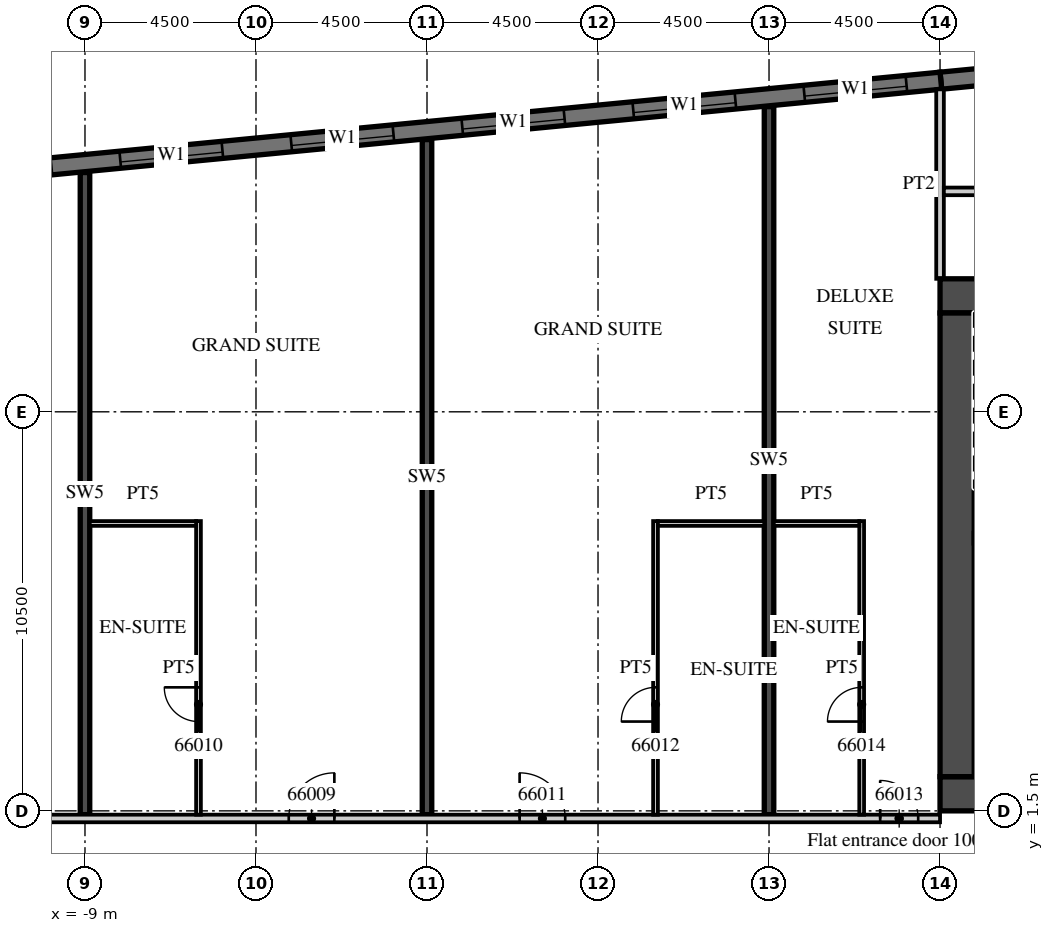
"""IFC4 building model, lengths in metres.
Left out: names, types, materials, properties, quantities, classifications, styles, units other than length and angle.
Written with IfcOpenShell. Run it as: python <this file> out.ifc"""

import sys

from ifc_helpers import new_model, si_unit, direction, frame, frame_2d, origin, place, context, subcontext, project, spatial, rectangle, extrude, element, fill, save


model = new_model("IFC4")
c1 = context("Model", 3, precision=1e-05, world=origin(), true_north=direction((0.0, 1.0)))
c2 = subcontext(c1, "Body", "Model", "MODEL_VIEW")
j1 = project(units=[si_unit("LENGTHUNIT", "METRE"), si_unit("PLANEANGLEUNIT", "RADIAN")], contexts=[c1])
p1 = place(None, origin())
s1 = spatial("IfcSite", under=j1, at=p1, CompositionType="ELEMENT")
p2 = place(p1, origin())
s2 = spatial("IfcBuilding", under=s1, at=p2, CompositionType="ELEMENT")
p3 = place(p2, frame((0.0, 0.0, 268.5)))
s3 = spatial("IfcBuildingStorey", under=s2, at=p3, CompositionType="ELEMENT", Elevation=268.5)
p4 = place(p3, frame((-9.0, 1.4, 0.0), z_axis=(0.0, 0.0, 1.0), x_axis=(0.0, 1.0, 0.0)))
e1 = element("IfcWall", 1, at=p4, inside=s3, PredefinedType="SHEAR", context=c2, shape_type="SweptSolid", body=[
    extrude(rectangle(XDim=16.896, YDim=0.25, at=frame_2d((8.448, 0.0))), origin(), (0.0, 0.0, 1.0), 3.3),
])
p5 = place(p3, frame((0.0, 1.4, 0.0), z_axis=(0.0, 0.0, 1.0), x_axis=(0.0, 1.0, 0.0)))
e2 = element("IfcWall", 2, at=p5, inside=s3, PredefinedType="SHEAR", context=c2, shape_type="SweptSolid", body=[
    extrude(rectangle(XDim=17.763, YDim=0.25, at=frame_2d((8.881, 0.0))), origin(), (0.0, 0.0, 1.0), 3.3),
])
p6 = place(p3, frame((9.0, 1.4, 0.0), z_axis=(0.0, 0.0, 1.0), x_axis=(0.0, 1.0, 0.0)))
e3 = element("IfcWall", 3, at=p6, inside=s3, PredefinedType="SHEAR", context=c2, shape_type="SweptSolid", body=[
    extrude(rectangle(XDim=18.629, YDim=0.25, at=frame_2d((9.315, 0.0))), origin(), (0.0, 0.0, 1.0), 3.3),
])
p7 = place(p3, frame((30.946, 22.391, 0.0), z_axis=(0.0, 0.0, 1.0), x_axis=(-0.995396397117, -0.095843688398, 0.0)))
e4 = element("IfcWall", 4, at=p7, inside=s3, PredefinedType="SOLIDWALL", context=c2, shape_type="SweptSolid", body=[
    extrude(rectangle(XDim=17.505, YDim=0.45, at=frame_2d((8.752, 0.0))), origin(), (0.0, 0.0, 1.0), 3.02),
])
p8 = place(p3, frame((13.521, 20.713, 0.0), z_axis=(0.0, 0.0, 1.0), x_axis=(-0.995396277313, -0.095844932638, 0.0)))
e5 = element("IfcWall", 5, at=p8, inside=s3, PredefinedType="SOLIDWALL", context=c2, shape_type="SweptSolid", body=[
    extrude(rectangle(XDim=51.495, YDim=0.45, at=frame_2d((25.748, 0.0))), origin(), (0.0, 0.0, 1.0), 3.02),
])
p9 = place(p8, frame((0.91, 0.0, 0.45)))
e6 = element("IfcOpeningElement", 6, at=p9, cuts=e5, PredefinedType="OPENING", context=c2, shape_type="SweptSolid", body=[
    extrude(rectangle(XDim=2.7, YDim=2.25, at=frame_2d((1.35, 1.125))), frame((0.0, 0.235, 0.0), z_axis=(0.0, -1.0, 0.0), x_axis=(1.0, 0.0, 0.0)), (0.0, 0.0, 1.0), 0.47),
])
p10 = place(p8, frame((5.431, 0.0, 0.45)))
e7 = element("IfcOpeningElement", 7, at=p10, cuts=e5, PredefinedType="OPENING", context=c2, shape_type="SweptSolid", body=[
    extrude(rectangle(XDim=2.7, YDim=2.25, at=frame_2d((1.35, 1.125))), frame((0.0, 0.235, 0.0), z_axis=(0.0, -1.0, 0.0), x_axis=(1.0, 0.0, 0.0)), (0.0, 0.0, 1.0), 0.47),
])
p11 = place(p8, frame((9.952, 0.0, 0.45)))
e8 = element("IfcOpeningElement", 8, at=p11, cuts=e5, PredefinedType="OPENING", context=c2, shape_type="SweptSolid", body=[
    extrude(rectangle(XDim=2.7, YDim=2.25, at=frame_2d((1.35, 1.125))), frame((0.0, 0.235, 0.0), z_axis=(0.0, -1.0, 0.0), x_axis=(1.0, 0.0, 0.0)), (0.0, 0.0, 1.0), 0.47),
])
p12 = place(p8, frame((14.473, 0.0, 0.45)))
e9 = element("IfcOpeningElement", 9, at=p12, cuts=e5, PredefinedType="OPENING", context=c2, shape_type="SweptSolid", body=[
    extrude(rectangle(XDim=2.7, YDim=2.25, at=frame_2d((1.35, 1.125))), frame((0.0, 0.235, 0.0), z_axis=(0.0, -1.0, 0.0), x_axis=(1.0, 0.0, 0.0)), (0.0, 0.0, 1.0), 0.47),
])
p13 = place(p8, frame((18.994, 0.0, 0.45)))
e10 = element("IfcOpeningElement", 10, at=p13, cuts=e5, PredefinedType="OPENING", context=c2, shape_type="SweptSolid", body=[
    extrude(rectangle(XDim=2.7, YDim=2.25, at=frame_2d((1.35, 1.125))), frame((0.0, 0.235, 0.0), z_axis=(0.0, -1.0, 0.0), x_axis=(1.0, 0.0, 0.0)), (0.0, 0.0, 1.0), 0.47),
])
p14 = place(p8, frame((23.514, 0.0, 0.45)))
e11 = element("IfcOpeningElement", 11, at=p14, cuts=e5, PredefinedType="OPENING", context=c2, shape_type="SweptSolid", body=[
    extrude(rectangle(XDim=2.7, YDim=2.25, at=frame_2d((1.35, 1.125))), frame((0.0, 0.235, 0.0), z_axis=(0.0, -1.0, 0.0), x_axis=(1.0, 0.0, 0.0)), (0.0, 0.0, 1.0), 0.47),
])
p15 = place(p8, frame((28.035, 0.0, 0.45)))
e12 = element("IfcOpeningElement", 12, at=p15, cuts=e5, PredefinedType="OPENING", context=c2, shape_type="SweptSolid", body=[
    extrude(rectangle(XDim=2.7, YDim=2.25, at=frame_2d((1.35, 1.125))), frame((0.0, 0.235, 0.0), z_axis=(0.0, -1.0, 0.0), x_axis=(1.0, 0.0, 0.0)), (0.0, 0.0, 1.0), 0.47),
])
p16 = place(p8, frame((32.556, 0.0, 0.45)))
e13 = element("IfcOpeningElement", 13, at=p16, cuts=e5, PredefinedType="OPENING", context=c2, shape_type="SweptSolid", body=[
    extrude(rectangle(XDim=2.7, YDim=2.25, at=frame_2d((1.35, 1.125))), frame((0.0, 0.235, 0.0), z_axis=(0.0, -1.0, 0.0), x_axis=(1.0, 0.0, 0.0)), (0.0, 0.0, 1.0), 0.47),
])
p17 = place(p8, frame((37.077, 0.0, 0.45)))
e14 = element("IfcOpeningElement", 14, at=p17, cuts=e5, PredefinedType="OPENING", context=c2, shape_type="SweptSolid", body=[
    extrude(rectangle(XDim=2.7, YDim=2.25, at=frame_2d((1.35, 1.125))), frame((0.0, 0.235, 0.0), z_axis=(0.0, -1.0, 0.0), x_axis=(1.0, 0.0, 0.0)), (0.0, 0.0, 1.0), 0.47),
])
p18 = place(p8, frame((41.598, 0.0, 0.45)))
e15 = element("IfcOpeningElement", 15, at=p18, cuts=e5, PredefinedType="OPENING", context=c2, shape_type="SweptSolid", body=[
    extrude(rectangle(XDim=2.7, YDim=2.25, at=frame_2d((1.35, 1.125))), frame((0.0, 0.235, 0.0), z_axis=(0.0, -1.0, 0.0), x_axis=(1.0, 0.0, 0.0)), (0.0, 0.0, 1.0), 0.47),
])
p19 = place(p8, frame((46.118, 0.0, 0.45)))
e16 = element("IfcOpeningElement", 16, at=p19, cuts=e5, PredefinedType="OPENING", context=c2, shape_type="SweptSolid", body=[
    extrude(rectangle(XDim=2.7, YDim=2.25, at=frame_2d((1.35, 1.125))), frame((0.0, 0.235, 0.0), z_axis=(0.0, -1.0, 0.0), x_axis=(1.0, 0.0, 0.0)), (0.0, 0.0, 1.0), 0.47),
])
p20 = place(p3, frame((13.5, 15.5, 0.0), z_axis=(0.0, 0.0, 1.0), x_axis=(0.0, 1.0, 0.0)))
e17 = element("IfcWall", 17, at=p20, inside=s3, PredefinedType="PARTITIONING", context=c2, shape_type="SweptSolid", body=[
    extrude(rectangle(XDim=4.985, YDim=0.2, at=frame_2d((2.493, 0.0))), origin(), (0.0, 0.0, 1.0), 3.02),
])
p21 = place(p3, frame((-39.909, 1.3, 0.0), z_axis=(0.0, 0.0, 1.0), x_axis=(1.0, 0.0, 0.0)))
e18 = element("IfcWall", 18, at=p21, inside=s3, PredefinedType="PARTITIONING", context=c2, shape_type="SweptSolid", body=[
    extrude(rectangle(XDim=53.409, YDim=0.2, at=frame_2d((26.705, 0.0))), origin(), (0.0, 0.0, 1.0), 3.02),
])
p22 = place(p21, frame((0.15, 0.0, 0.0)))
e19 = element("IfcOpeningElement", 19, at=p22, cuts=e18, PredefinedType="OPENING", context=c2, shape_type="SweptSolid", body=[
    extrude(rectangle(XDim=0.9, YDim=2.1, at=frame_2d((0.45, 1.05))), frame((0.0, 0.11, 0.0), z_axis=(0.0, -1.0, 0.0), x_axis=(1.0, 0.0, 0.0)), (0.0, 0.0, 1.0), 0.22),
])
p23 = place(p21, frame((9.271, 0.0, 0.0)))
e20 = element("IfcOpeningElement", 20, at=p23, cuts=e18, PredefinedType="OPENING", context=c2, shape_type="SweptSolid", body=[
    extrude(rectangle(XDim=1.2, YDim=2.1, at=frame_2d((0.6, 1.05))), frame((0.0, 0.11, 0.0), z_axis=(0.0, -1.0, 0.0), x_axis=(1.0, 0.0, 0.0)), (0.0, 0.0, 1.0), 0.22),
])
p24 = place(p21, frame((18.271, 0.0, 0.0)))
e21 = element("IfcOpeningElement", 21, at=p24, cuts=e18, PredefinedType="OPENING", context=c2, shape_type="SweptSolid", body=[
    extrude(rectangle(XDim=1.2, YDim=2.1, at=frame_2d((0.6, 1.05))), frame((0.0, 0.11, 0.0), z_axis=(0.0, -1.0, 0.0), x_axis=(1.0, 0.0, 0.0)), (0.0, 0.0, 1.0), 0.22),
])
p25 = place(p21, frame((27.271, 0.0, 0.0)))
e22 = element("IfcOpeningElement", 22, at=p25, cuts=e18, PredefinedType="OPENING", context=c2, shape_type="SweptSolid", body=[
    extrude(rectangle(XDim=1.2, YDim=2.1, at=frame_2d((0.6, 1.05))), frame((0.0, 0.11, 0.0), z_axis=(0.0, -1.0, 0.0), x_axis=(1.0, 0.0, 0.0)), (0.0, 0.0, 1.0), 0.22),
])
p26 = place(p21, frame((36.271, 0.0, 0.0)))
e23 = element("IfcOpeningElement", 23, at=p26, cuts=e18, PredefinedType="OPENING", context=c2, shape_type="SweptSolid", body=[
    extrude(rectangle(XDim=1.2, YDim=2.1, at=frame_2d((0.6, 1.05))), frame((0.0, 0.11, 0.0), z_axis=(0.0, -1.0, 0.0), x_axis=(1.0, 0.0, 0.0)), (0.0, 0.0, 1.0), 0.22),
])
p27 = place(p21, frame((42.346, 0.0, 0.0)))
e24 = element("IfcOpeningElement", 24, at=p27, cuts=e18, PredefinedType="OPENING", context=c2, shape_type="SweptSolid", body=[
    extrude(rectangle(XDim=1.2, YDim=2.1, at=frame_2d((0.6, 1.05))), frame((0.0, 0.11, 0.0), z_axis=(0.0, -1.0, 0.0), x_axis=(1.0, 0.0, 0.0)), (0.0, 0.0, 1.0), 0.22),
])
p28 = place(p21, frame((51.834, 0.0, 0.0)))
e25 = element("IfcOpeningElement", 25, at=p28, cuts=e18, PredefinedType="OPENING", context=c2, shape_type="SweptSolid", body=[
    extrude(rectangle(XDim=1.0, YDim=2.1, at=frame_2d((0.5, 1.05))), frame((0.0, 0.11, 0.0), z_axis=(0.0, -1.0, 0.0), x_axis=(1.0, 0.0, 0.0)), (0.0, 0.0, 1.0), 0.22),
])
p29 = place(p3, frame((-6.013, 1.4, 0.0), z_axis=(0.0, 0.0, 1.0), x_axis=(0.0, 1.0, 0.0)))
e26 = element("IfcWall", 26, at=p29, inside=s3, PredefinedType="PARTITIONING", context=c2, shape_type="SweptSolid", body=[
    extrude(rectangle(XDim=7.725, YDim=0.125, at=frame_2d((3.863, 0.0))), origin(), (0.0, 0.0, 1.0), 3.02),
])
p30 = place(p29, frame((2.45, 0.0, 0.0)))
e27 = element("IfcOpeningElement", 27, at=p30, cuts=e26, PredefinedType="OPENING", context=c2, shape_type="SweptSolid", body=[
    extrude(rectangle(XDim=0.9, YDim=2.1, at=frame_2d((0.45, 1.05))), frame((0.0, 0.073, 0.0), z_axis=(0.0, -1.0, 0.0), x_axis=(1.0, 0.0, 0.0)), (0.0, 0.0, 1.0), 0.145),
])
p31 = place(p3, frame((-8.875, 9.062, 0.0), z_axis=(0.0, 0.0, 1.0), x_axis=(1.0, 0.0, 0.0)))
e28 = element("IfcWall", 28, at=p31, inside=s3, PredefinedType="PARTITIONING", context=c2, shape_type="SweptSolid", body=[
    extrude(rectangle(XDim=2.8, YDim=0.125, at=frame_2d((1.4, 0.0))), origin(), (0.0, 0.0, 1.0), 3.02),
])
p32 = place(p3, frame((6.013, 1.4, 0.0), z_axis=(0.0, 0.0, 1.0), x_axis=(0.0, 1.0, 0.0)))
e29 = element("IfcWall", 29, at=p32, inside=s3, PredefinedType="PARTITIONING", context=c2, shape_type="SweptSolid", body=[
    extrude(rectangle(XDim=7.725, YDim=0.125, at=frame_2d((3.863, 0.0))), origin(), (0.0, 0.0, 1.0), 3.02),
])
p33 = place(p32, frame((2.45, 0.0, 0.0)))
e30 = element("IfcOpeningElement", 30, at=p33, cuts=e29, PredefinedType="OPENING", context=c2, shape_type="SweptSolid", body=[
    extrude(rectangle(XDim=0.9, YDim=2.1, at=frame_2d((0.45, 1.05))), frame((0.0, 0.073, 0.0), z_axis=(0.0, -1.0, 0.0), x_axis=(1.0, 0.0, 0.0)), (0.0, 0.0, 1.0), 0.145),
])
p34 = place(p3, frame((6.075, 9.062, 0.0), z_axis=(0.0, 0.0, 1.0), x_axis=(1.0, 0.0, 0.0)))
e31 = element("IfcWall", 31, at=p34, inside=s3, PredefinedType="PARTITIONING", context=c2, shape_type="SweptSolid", body=[
    extrude(rectangle(XDim=2.8, YDim=0.125, at=frame_2d((1.4, 0.0))), origin(), (0.0, 0.0, 1.0), 3.02),
])
p35 = place(p3, frame((11.438, 1.4, 0.0), z_axis=(0.0, 0.0, 1.0), x_axis=(0.0, 1.0, 0.0)))
e32 = element("IfcWall", 32, at=p35, inside=s3, PredefinedType="PARTITIONING", context=c2, shape_type="SweptSolid", body=[
    extrude(rectangle(XDim=7.725, YDim=0.125, at=frame_2d((3.863, 0.0))), origin(), (0.0, 0.0, 1.0), 3.02),
])
p36 = place(p35, frame((2.45, 0.0, 0.0)))
e33 = element("IfcOpeningElement", 33, at=p36, cuts=e32, PredefinedType="OPENING", context=c2, shape_type="SweptSolid", body=[
    extrude(rectangle(XDim=0.9, YDim=2.1, at=frame_2d((0.45, 1.05))), frame((0.0, 0.073, 0.0), z_axis=(0.0, -1.0, 0.0), x_axis=(1.0, 0.0, 0.0)), (0.0, 0.0, 1.0), 0.145),
])
p37 = place(p3, frame((9.125, 9.062, 0.0), z_axis=(0.0, 0.0, 1.0), x_axis=(1.0, 0.0, 0.0)))
e34 = element("IfcWall", 34, at=p37, inside=s3, PredefinedType="PARTITIONING", context=c2, shape_type="SweptSolid", body=[
    extrude(rectangle(XDim=2.25, YDim=0.125, at=frame_2d((1.125, 0.0))), origin(), (0.0, 0.0, 1.0), 3.02),
])
p38 = place(p3, frame((13.5, 1.95, 0.0), z_axis=(0.0, 0.0, 1.0), x_axis=(1.0, 0.0, 0.0)))
e35 = element("IfcWall", 35, at=p38, inside=s3, PredefinedType="SHEAR", context=c2, shape_type="SweptSolid", body=[
    extrude(rectangle(XDim=18.0, YDim=0.9, at=frame_2d((9.0, 0.0))), origin(), (0.0, 0.0, 1.0), 3.02),
])
p39 = place(p38, frame((1.475, 0.0, 0.0)))
e36 = element("IfcOpeningElement", 36, at=p39, cuts=e35, PredefinedType="OPENING", context=c2, shape_type="SweptSolid", body=[
    extrude(rectangle(XDim=1.8, YDim=2.1, at=frame_2d((0.9, 1.05))), frame((0.0, 0.46, 0.0), z_axis=(0.0, -1.0, 0.0), x_axis=(1.0, 0.0, 0.0)), (0.0, 0.0, 1.0), 0.92),
])
p40 = place(p3, frame((13.5, 15.05, 0.0), z_axis=(0.0, 0.0, 1.0), x_axis=(1.0, 0.0, 0.0)))
e37 = element("IfcWall", 37, at=p40, inside=s3, PredefinedType="SHEAR", context=c2, shape_type="SweptSolid", body=[
    extrude(rectangle(XDim=6.8, YDim=0.9, at=frame_2d((3.4, 0.0))), origin(), (0.0, 0.0, 1.0), 3.02),
])
p41 = place(p40, frame((4.725, 0.0, 0.0)))
e38 = element("IfcOpeningElement", 38, at=p41, cuts=e37, PredefinedType="OPENING", context=c2, shape_type="SweptSolid", body=[
    extrude(rectangle(XDim=1.2, YDim=2.1, at=frame_2d((0.6, 1.05))), frame((0.0, 0.46, 0.0), z_axis=(0.0, -1.0, 0.0), x_axis=(1.0, 0.0, 0.0)), (0.0, 0.0, 1.0), 0.92),
])
p42 = place(p3, frame((13.95, 2.4, 0.0), z_axis=(0.0, 0.0, 1.0), x_axis=(0.0, 1.0, 0.0)))
e39 = element("IfcWall", 39, at=p42, inside=s3, PredefinedType="SHEAR", context=c2, shape_type="SweptSolid", body=[
    extrude(rectangle(XDim=12.2, YDim=0.9, at=frame_2d((6.1, 0.0))), origin(), (0.0, 0.0, 1.0), 3.02),
])
p43 = place(p3, frame((13.6, 17.8, 0.0), z_axis=(0.0, 0.0, 1.0), x_axis=(1.0, 0.0, 0.0)))
e40 = element("IfcWall", 40, at=p43, inside=s3, PredefinedType="PARTITIONING", context=c2, shape_type="SweptSolid", body=[
    extrude(rectangle(XDim=21.354, YDim=0.2, at=frame_2d((10.677, 0.0))), origin(), (0.0, 0.0, 1.0), 3.02),
])
p44 = place(p43, frame((17.812, 0.0, 0.0)))
e41 = element("IfcOpeningElement", 41, at=p44, cuts=e40, PredefinedType="OPENING", context=c2, shape_type="SweptSolid", body=[
    extrude(rectangle(XDim=0.9, YDim=2.1, at=frame_2d((0.45, 1.05))), frame((0.0, 0.11, 0.0), z_axis=(0.0, -1.0, 0.0), x_axis=(1.0, 0.0, 0.0)), (0.0, 0.0, 1.0), 0.22),
])
p45 = place(p43, frame((9.512, 0.0, 0.0)))
e42 = element("IfcOpeningElement", 42, at=p45, cuts=e40, PredefinedType="OPENING", context=c2, shape_type="SweptSolid", body=[
    extrude(rectangle(XDim=0.9, YDim=2.1, at=frame_2d((0.45, 1.05))), frame((0.0, 0.11, 0.0), z_axis=(0.0, -1.0, 0.0), x_axis=(1.0, 0.0, 0.0)), (0.0, 0.0, 1.0), 0.22),
])
p46 = place(p9, origin())
e43 = element("IfcWindow", 43, at=p46, inside=s3, PartitioningType="SINGLE_PANEL", PredefinedType="WINDOW", context=c2, shape_type="SweptSolid", body=[
    extrude(rectangle(XDim=2.7, YDim=2.25, at=frame_2d((1.35, 1.125))), frame((0.0, 0.09, 0.0), z_axis=(0.0, -1.0, 0.0), x_axis=(1.0, 0.0, 0.0)), (0.0, 0.0, 1.0), 0.06),
])
fill(e6, e43)
p47 = place(p10, origin())
e44 = element("IfcWindow", 44, at=p47, inside=s3, PartitioningType="SINGLE_PANEL", PredefinedType="WINDOW", context=c2, shape_type="SweptSolid", body=[
    extrude(rectangle(XDim=2.7, YDim=2.25, at=frame_2d((1.35, 1.125))), frame((0.0, 0.09, 0.0), z_axis=(0.0, -1.0, 0.0), x_axis=(1.0, 0.0, 0.0)), (0.0, 0.0, 1.0), 0.06),
])
fill(e7, e44)
p48 = place(p11, origin())
e45 = element("IfcWindow", 45, at=p48, inside=s3, PartitioningType="SINGLE_PANEL", PredefinedType="WINDOW", context=c2, shape_type="SweptSolid", body=[
    extrude(rectangle(XDim=2.7, YDim=2.25, at=frame_2d((1.35, 1.125))), frame((0.0, 0.09, 0.0), z_axis=(0.0, -1.0, 0.0), x_axis=(1.0, 0.0, 0.0)), (0.0, 0.0, 1.0), 0.06),
])
fill(e8, e45)
p49 = place(p12, origin())
e46 = element("IfcWindow", 46, at=p49, inside=s3, PartitioningType="SINGLE_PANEL", PredefinedType="WINDOW", context=c2, shape_type="SweptSolid", body=[
    extrude(rectangle(XDim=2.7, YDim=2.25, at=frame_2d((1.35, 1.125))), frame((0.0, 0.09, 0.0), z_axis=(0.0, -1.0, 0.0), x_axis=(1.0, 0.0, 0.0)), (0.0, 0.0, 1.0), 0.06),
])
fill(e9, e46)
p50 = place(p13, origin())
e47 = element("IfcWindow", 47, at=p50, inside=s3, PartitioningType="SINGLE_PANEL", PredefinedType="WINDOW", context=c2, shape_type="SweptSolid", body=[
    extrude(rectangle(XDim=2.7, YDim=2.25, at=frame_2d((1.35, 1.125))), frame((0.0, 0.09, 0.0), z_axis=(0.0, -1.0, 0.0), x_axis=(1.0, 0.0, 0.0)), (0.0, 0.0, 1.0), 0.06),
])
fill(e10, e47)
p51 = place(p26, origin())
e48 = element("IfcDoor", 48, at=p51, inside=s3, OperationType="SINGLE_SWING_RIGHT", PredefinedType="DOOR", context=c2, shape_type="SweptSolid", body=[
    extrude(rectangle(XDim=1.2, YDim=2.1, at=frame_2d((0.6, 1.05))), frame((0.0, 0.025, 0.0), z_axis=(0.0, -1.0, 0.0), x_axis=(1.0, 0.0, 0.0)), (0.0, 0.0, 1.0), 0.05),
])
fill(e23, e48)
p52 = place(p30, origin())
e49 = element("IfcDoor", 49, at=p52, inside=s3, OperationType="SINGLE_SWING_RIGHT", PredefinedType="DOOR", context=c2, shape_type="SweptSolid", body=[
    extrude(rectangle(XDim=0.9, YDim=2.1, at=frame_2d((0.45, 1.05))), frame((0.0, 0.025, 0.0), z_axis=(0.0, -1.0, 0.0), x_axis=(1.0, 0.0, 0.0)), (0.0, 0.0, 1.0), 0.05),
])
fill(e27, e49)
p53 = place(p27, origin())
e50 = element("IfcDoor", 50, at=p53, inside=s3, OperationType="SINGLE_SWING_LEFT", PredefinedType="DOOR", context=c2, shape_type="SweptSolid", body=[
    extrude(rectangle(XDim=1.2, YDim=2.1, at=frame_2d((0.6, 1.05))), frame((0.0, 0.025, 0.0), z_axis=(0.0, -1.0, 0.0), x_axis=(1.0, 0.0, 0.0)), (0.0, 0.0, 1.0), 0.05),
])
fill(e24, e50)
p54 = place(p33, origin())
e51 = element("IfcDoor", 51, at=p54, inside=s3, OperationType="SINGLE_SWING_LEFT", PredefinedType="DOOR", context=c2, shape_type="SweptSolid", body=[
    extrude(rectangle(XDim=0.9, YDim=2.1, at=frame_2d((0.45, 1.05))), frame((0.0, 0.025, 0.0), z_axis=(0.0, -1.0, 0.0), x_axis=(1.0, 0.0, 0.0)), (0.0, 0.0, 1.0), 0.05),
])
fill(e30, e51)
p55 = place(p28, origin())
e52 = element("IfcDoor", 52, at=p55, inside=s3, OperationType="SINGLE_SWING_LEFT", PredefinedType="DOOR", context=c2, shape_type="SweptSolid", body=[
    extrude(rectangle(XDim=1.0, YDim=2.1, at=frame_2d((0.5, 1.05))), frame((0.0, 0.025, 0.0), z_axis=(0.0, -1.0, 0.0), x_axis=(1.0, 0.0, 0.0)), (0.0, 0.0, 1.0), 0.05),
])
fill(e25, e52)
p56 = place(p36, origin())
e53 = element("IfcDoor", 53, at=p56, inside=s3, OperationType="SINGLE_SWING_LEFT", PredefinedType="DOOR", context=c2, shape_type="SweptSolid", body=[
    extrude(rectangle(XDim=0.9, YDim=2.1, at=frame_2d((0.45, 1.05))), frame((0.0, 0.025, 0.0), z_axis=(0.0, -1.0, 0.0), x_axis=(1.0, 0.0, 0.0)), (0.0, 0.0, 1.0), 0.05),
])
fill(e33, e53)
save(model, sys.argv[1])
